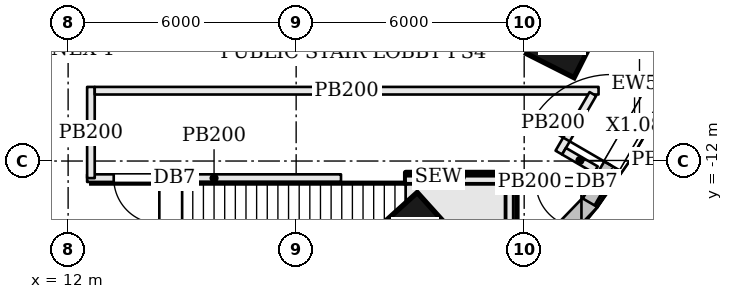
"""IFC4 building model, lengths in metres.
Left out: names, types, materials, properties, quantities, classifications, styles, units other than length and angle.
Written with IfcOpenShell. Run it as: python <this file> out.ifc"""

import sys

from ifc_helpers import new_model, si_unit, direction, frame, frame_2d, origin, origin_2d, place, context, subcontext, project, spatial, rectangle, extrude, element, fill, save


model = new_model("IFC4")
c1 = context("Model", 3, precision=1e-05, world=origin(), true_north=direction((0.0, 1.0)))
c2 = subcontext(c1, "Body", "Model", "MODEL_VIEW")
j1 = project(units=[si_unit("LENGTHUNIT", "METRE"), si_unit("PLANEANGLEUNIT", "RADIAN")], contexts=[c1])
p1 = place(None, origin())
s1 = spatial("IfcSite", under=j1, at=p1, CompositionType="ELEMENT")
p2 = place(p1, origin())
s2 = spatial("IfcBuilding", under=s1, at=p2, CompositionType="ELEMENT")
p3 = place(p2, origin())
s3 = spatial("IfcBuildingStorey", under=s2, at=p3, CompositionType="ELEMENT", Elevation=0.0)
for number, where, z_axis, x_axis in (
    (1, (21.135, -13.817, 0.0), (0.0, 0.0, 1.0), (0.743, 0.67, 0.0)),
    (2, (25.003, -8.866, 0.0), (0.0, 0.0, 1.0), (0.45, 0.893, 0.0)),
):
    element("IfcColumn", number, at=place(p3, frame(where, z_axis=z_axis, x_axis=x_axis)), inside=s3, PredefinedType="COLUMN", context=c2, shape_type="SweptSolid", body=[
        extrude(rectangle(XDim=1.4, YDim=1.4, at=origin_2d()), origin(), (0.0, 0.0, 1.0), 7.2),
    ])
p4 = place(p3, frame((22.577, -16.365, 0.0), z_axis=(0.0, 0.0, 1.0), x_axis=(0.694191591241, 0.719790271294, 0.0)))
e3 = element("IfcWall", 3, at=p4, inside=s3, PredefinedType="SOLIDWALL", context=c2, shape_type="SweptSolid", body=[
    extrude(rectangle(XDim=4.597, YDim=0.45, at=frame_2d((2.298, 0.0))), origin(), (0.0, 0.0, 1.0), 6.95),
])
p5 = place(p3, frame((25.735, -13.099, 0.0), z_axis=(0.0, 0.0, 1.0), x_axis=(0.502106426501, 0.864805837438, 0.0)))
e4 = element("IfcWall", 4, at=p5, inside=s3, PredefinedType="SOLIDWALL", context=c2, shape_type="SweptSolid", body=[
    extrude(rectangle(XDim=4.657, YDim=0.45, at=frame_2d((2.328, 0.0))), origin(), (0.0, 0.0, 1.0), 3.55),
])
p6 = place(p5, frame((1.128, 0.0, 0.0)))
e5 = element("IfcOpeningElement", 5, at=p6, cuts=e4, PredefinedType="OPENING", context=c2, shape_type="SweptSolid", body=[
    extrude(rectangle(XDim=2.4, YDim=3.2, at=frame_2d((1.2, 1.6))), frame((0.0, 0.235, 0.0), z_axis=(0.0, -1.0, 0.0), x_axis=(1.0, 0.0, 0.0)), (0.0, 0.0, 1.0), 0.47),
])
p7 = place(p3, frame((25.66, -12.55, 0.0), z_axis=(0.0, 0.0, 1.0), x_axis=(-1.0, 0.0, 0.0)))
e6 = element("IfcWall", 6, at=p7, inside=s3, PredefinedType="PARTITIONING", context=c2, shape_type="SweptSolid", body=[
    extrude(rectangle(XDim=1.83, YDim=0.2, at=frame_2d((0.915, 0.0))), origin(), (0.0, 0.0, 1.0), 6.23),
])
p8 = place(p7, frame((0.153, 0.0, 0.0)))
e7 = element("IfcOpeningElement", 7, at=p8, cuts=e6, PredefinedType="OPENING", context=c2, shape_type="SweptSolid", body=[
    extrude(rectangle(XDim=1.2, YDim=2.1, at=frame_2d((0.6, 1.05))), frame((0.0, 0.11, 0.0), z_axis=(0.0, -1.0, 0.0), x_axis=(1.0, 0.0, 0.0)), (0.0, 0.0, 1.0), 0.22),
])
p9 = place(p3, frame((19.18, -12.45, 0.0), z_axis=(0.0, 0.0, 1.0), x_axis=(-1.0, 0.0, 0.0)))
e8 = element("IfcWall", 8, at=p9, inside=s3, PredefinedType="PARTITIONING", context=c2, shape_type="SweptSolid", body=[
    extrude(rectangle(XDim=6.68, YDim=0.2, at=frame_2d((3.34, 0.0))), origin(), (0.0, 0.0, 1.0), 6.23),
])
p10 = place(p9, frame((4.78, 0.0, 0.0)))
e9 = element("IfcOpeningElement", 9, at=p10, cuts=e8, PredefinedType="OPENING", context=c2, shape_type="SweptSolid", body=[
    extrude(rectangle(XDim=1.2, YDim=2.1, at=frame_2d((0.6, 1.05))), frame((0.0, 0.11, 0.0), z_axis=(0.0, -1.0, 0.0), x_axis=(1.0, 0.0, 0.0)), (0.0, 0.0, 1.0), 0.22),
])
p11 = place(p3, frame((12.6, -12.45, 0.0), z_axis=(0.0, 0.0, 1.0), x_axis=(0.0, 1.0, 0.0)))
e10 = element("IfcWall", 10, at=p11, inside=s3, PredefinedType="PARTITIONING", context=c2, shape_type="SweptSolid", body=[
    extrude(rectangle(XDim=2.4, YDim=0.2, at=frame_2d((1.2, 0.0))), origin(), (0.0, 0.0, 1.0), 6.23),
])
p12 = place(p3, frame((12.7, -10.15, 0.0), z_axis=(0.0, 0.0, 1.0), x_axis=(1.0, 0.0, 0.0)))
e11 = element("IfcWall", 11, at=p12, inside=s3, PredefinedType="PARTITIONING", context=c2, shape_type="SweptSolid", body=[
    extrude(rectangle(XDim=13.257, YDim=0.2, at=frame_2d((6.628, 0.0))), origin(), (0.0, 0.0, 1.0), 6.23),
])
p13 = place(p3, frame((25.807, -10.236, 0.0), z_axis=(0.0, 0.0, 1.0), x_axis=(-0.50189432983, -0.864928946032, 0.0)))
e12 = element("IfcWall", 12, at=p13, inside=s3, PredefinedType="PARTITIONING", context=c2, shape_type="SweptSolid", body=[
    extrude(rectangle(XDim=1.783, YDim=0.2, at=frame_2d((0.891, 0.0))), origin(), (0.0, 0.0, 1.0), 6.23),
])
p14 = place(p3, frame((25.048, -11.742, 0.0), z_axis=(0.0, 0.0, 1.0), x_axis=(0.864728870448, -0.502238967638, 0.0)))
e13 = element("IfcWall", 13, at=p14, inside=s3, PredefinedType="PARTITIONING", context=c2, shape_type="SweptSolid", body=[
    extrude(rectangle(XDim=0.968, YDim=0.2, at=frame_2d((0.484, 0.0))), origin(), (0.0, 0.0, 1.0), 6.23),
])
p15 = place(p3, frame((23.685, -17.5, 0.0), z_axis=(0.0, 0.0, 1.0), x_axis=(0.0, 1.0, 0.0)))
e14 = element("IfcWall", 14, at=p15, inside=s3, PredefinedType="SOLIDWALL", context=c2, shape_type="SweptSolid", body=[
    extrude(rectangle(XDim=4.95, YDim=0.25, at=frame_2d((2.475, 0.0))), origin(), (0.0, 0.0, 1.0), 6.95),
])
p16 = place(p3, frame((20.88, -12.425, 0.0), z_axis=(0.0, 0.0, 1.0), x_axis=(1.0, 0.0, 0.0)))
e15 = element("IfcWall", 15, at=p16, inside=s3, PredefinedType="SOLIDWALL", context=c2, shape_type="SweptSolid", body=[
    extrude(rectangle(XDim=2.93, YDim=0.25, at=frame_2d((1.465, 0.0))), origin(), (0.0, 0.0, 1.0), 6.95),
])
p17 = place(p6, origin())
e16 = element("IfcDoor", 16, at=p17, inside=s3, OperationType="DOUBLE_DOOR_DOUBLE_SWING", PredefinedType="DOOR", context=c2, shape_type="SweptSolid", body=[
    extrude(rectangle(XDim=2.4, YDim=3.2, at=frame_2d((1.2, 1.6))), frame((0.0, 0.025, 0.0), z_axis=(0.0, -1.0, 0.0), x_axis=(1.0, 0.0, 0.0)), (0.0, 0.0, 1.0), 0.05),
])
fill(e5, e16)
p18 = place(p10, origin())
e17 = element("IfcDoor", 17, at=p18, inside=s3, OperationType="SINGLE_SWING_LEFT", PredefinedType="DOOR", context=c2, shape_type="SweptSolid", body=[
    extrude(rectangle(XDim=1.2, YDim=2.1, at=frame_2d((0.6, 1.05))), frame((0.0, 0.025, 0.0), z_axis=(0.0, -1.0, 0.0), x_axis=(1.0, 0.0, 0.0)), (0.0, 0.0, 1.0), 0.05),
])
fill(e9, e17)
p19 = place(p8, origin())
e18 = element("IfcDoor", 18, at=p19, inside=s3, OperationType="SINGLE_SWING_LEFT", PredefinedType="DOOR", context=c2, shape_type="SweptSolid", body=[
    extrude(rectangle(XDim=1.2, YDim=2.1, at=frame_2d((0.6, 1.05))), frame((0.0, 0.025, 0.0), z_axis=(0.0, -1.0, 0.0), x_axis=(1.0, 0.0, 0.0)), (0.0, 0.0, 1.0), 0.05),
])
fill(e7, e18)
save(model, sys.argv[1])
